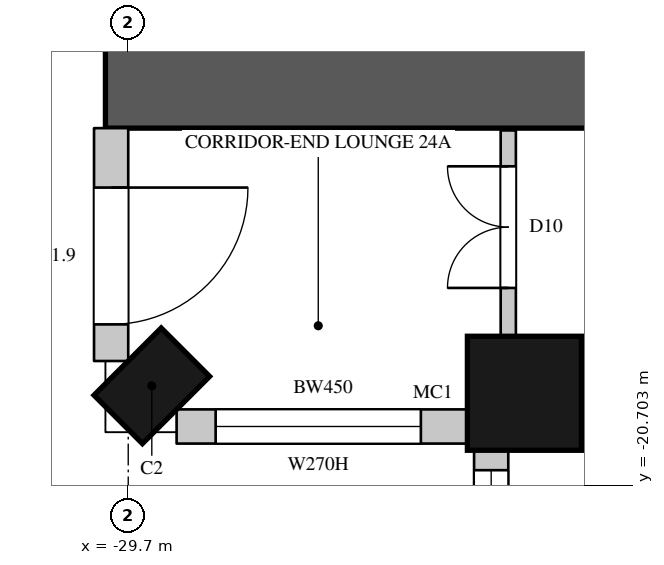
"""IFC4 building model, lengths in metres.
Left out: names, types, materials, properties, quantities, classifications, styles, units other than length and angle.
Written with IfcOpenShell. Run it as: python <this file> out.ifc"""

import sys

from ifc_helpers import new_model, si_unit, direction, frame, frame_2d, origin, origin_2d, place, context, subcontext, project, spatial, rectangle, circle, extrude, element, fill, save


model = new_model("IFC4")
c1 = context("Model", 3, precision=1e-05, world=origin(), true_north=direction((0.0, 1.0)))
c2 = subcontext(c1, "Body", "Model", "MODEL_VIEW")
j1 = project(units=[si_unit("LENGTHUNIT", "METRE"), si_unit("PLANEANGLEUNIT", "RADIAN")], contexts=[c1])
p1 = place(None, origin())
s1 = spatial("IfcSite", under=j1, at=p1, CompositionType="ELEMENT")
p2 = place(p1, origin())
s2 = spatial("IfcBuilding", under=s1, at=p2, CompositionType="ELEMENT")
p3 = place(p2, frame((0.0, 0.0, 116.7)))
s3 = spatial("IfcBuildingStorey", under=s2, at=p3, CompositionType="ELEMENT", Elevation=116.7)
p4 = place(p3, frame((-29.39, -19.39, 0.0), z_axis=(0.0, 0.0, 1.0), x_axis=(0.707106781187, -0.707106781187, 0.0)))
e1 = element("IfcColumn", 1, at=p4, inside=s3, PredefinedType="COLUMN", context=c2, shape_type="SweptSolid", body=[
    extrude(rectangle(XDim=0.9, YDim=1.25, at=origin_2d()), origin(), (0.0, 0.0, 1.0), 3.6),
])
p5 = place(p3, frame((-24.488, -19.488, 0.0), z_axis=(0.0, 0.0, 1.0), x_axis=(1.0, 0.0, 0.0)))
e2 = element("IfcColumn", 2, at=p5, inside=s3, PredefinedType="COLUMN", context=c2, shape_type="SweptSolid", body=[
    extrude(circle(Radius=0.75, at=origin_2d()), origin(), (0.0, 0.0, 1.0), 3.6),
])
p6 = place(p3, frame((-29.925, -16.0, 0.0), z_axis=(0.0, 0.0, 1.0), x_axis=(0.0, -1.0, 0.0)))
e3 = element("IfcWall", 3, at=p6, inside=s3, PredefinedType="SOLIDWALL", context=c2, shape_type="SweptSolid", body=[
    extrude(rectangle(XDim=3.064, YDim=0.45, at=frame_2d((1.532, 0.0))), origin(), (0.0, 0.0, 1.0), 3.3),
])
p7 = place(p6, frame((0.782, 0.0, 0.0)))
e4 = element("IfcOpeningElement", 4, at=p7, cuts=e3, PredefinedType="OPENING", context=c2, shape_type="SweptSolid", body=[
    extrude(rectangle(XDim=1.8, YDim=2.4, at=frame_2d((0.9, 1.2))), frame((0.0, 0.235, 0.0), z_axis=(0.0, -1.0, 0.0), x_axis=(1.0, 0.0, 0.0)), (0.0, 0.0, 1.0), 0.47),
])
p8 = place(p3, frame((-29.064, -19.925, 0.0), z_axis=(0.0, 0.0, 1.0), x_axis=(1.0, 0.0, 0.0)))
e5 = element("IfcWall", 5, at=p8, inside=s3, PredefinedType="SOLIDWALL", context=c2, shape_type="SweptSolid", body=[
    extrude(rectangle(XDim=3.857, YDim=0.45, at=frame_2d((1.928, 0.0))), origin(), (0.0, 0.0, 1.0), 3.3),
])
p9 = place(p8, frame((0.514, 0.0, 1.05)))
e6 = element("IfcOpeningElement", 6, at=p9, cuts=e5, PredefinedType="OPENING", context=c2, shape_type="SweptSolid", body=[
    extrude(rectangle(XDim=2.7, YDim=2.0, at=frame_2d((1.35, 1.0))), frame((0.0, 0.235, 0.0), z_axis=(0.0, -1.0, 0.0), x_axis=(1.0, 0.0, 0.0)), (0.0, 0.0, 1.0), 0.47),
])
p10 = place(p3, frame((-24.925, -20.207, 0.0), z_axis=(0.0, 0.0, 1.0), x_axis=(0.0, -1.0, 0.0)))
e7 = element("IfcWall", 7, at=p10, inside=s3, PredefinedType="SOLIDWALL", context=c2, shape_type="SweptSolid", body=[
    extrude(rectangle(XDim=1.843, YDim=0.45, at=frame_2d((0.921, 0.0))), origin(), (0.0, 0.0, 1.0), 3.3),
])
p11 = place(p10, frame((0.293, 0.0, 1.05)))
e8 = element("IfcOpeningElement", 8, at=p11, cuts=e7, PredefinedType="OPENING", context=c2, shape_type="SweptSolid", body=[
    extrude(rectangle(XDim=1.2, YDim=2.0, at=frame_2d((0.6, 1.0))), frame((0.0, 0.235, 0.0), z_axis=(0.0, -1.0, 0.0), x_axis=(1.0, 0.0, 0.0)), (0.0, 0.0, 1.0), 0.47),
])
p12 = place(p3, frame((-30.0, -15.4, 0.0), z_axis=(0.0, 0.0, 1.0), x_axis=(1.0, 0.0, 0.0)))
e9 = element("IfcWall", 9, at=p12, inside=s3, PredefinedType="SHEAR", context=c2, shape_type="SweptSolid", body=[
    extrude(rectangle(XDim=16.0, YDim=1.2, at=frame_2d((8.0, 0.0))), origin(), (0.0, 0.0, 1.0), 3.6),
])
p13 = place(p12, frame((13.4, 0.0, 0.0)))
e10 = element("IfcOpeningElement", 10, at=p13, cuts=e9, PredefinedType="OPENING", context=c2, shape_type="SweptSolid", body=[
    extrude(rectangle(XDim=1.5, YDim=2.4, at=frame_2d((0.75, 1.2))), frame((0.0, 0.61, 0.0), z_axis=(0.0, -1.0, 0.0), x_axis=(1.0, 0.0, 0.0)), (0.0, 0.0, 1.0), 1.22),
])
p14 = place(p3, frame((-24.7, -18.752, 0.0), z_axis=(0.0, 0.0, 1.0), x_axis=(0.0, 1.0, 0.0)))
e11 = element("IfcWall", 11, at=p14, inside=s3, PredefinedType="PARTITIONING", context=c2, shape_type="SweptSolid", body=[
    extrude(rectangle(XDim=2.722, YDim=0.2, at=frame_2d((1.361, 0.0))), origin(), (0.0, 0.0, 1.0), 3.3),
])
p15 = place(p14, frame((0.65, 0.0, 0.0)))
e12 = element("IfcOpeningElement", 12, at=p15, cuts=e11, PredefinedType="OPENING", context=c2, shape_type="SweptSolid", body=[
    extrude(rectangle(XDim=1.6, YDim=2.4, at=frame_2d((0.8, 1.2))), frame((0.0, 0.11, 0.0), z_axis=(0.0, -1.0, 0.0), x_axis=(1.0, 0.0, 0.0)), (0.0, 0.0, 1.0), 0.22),
])
p16 = place(p3, frame((-23.752, -19.7, 0.0), z_axis=(0.0, 0.0, 1.0), x_axis=(1.0, 0.0, 0.0)))
e13 = element("IfcWall", 13, at=p16, inside=s3, PredefinedType="PARTITIONING", context=c2, shape_type="SweptSolid", body=[
    extrude(rectangle(XDim=5.152, YDim=0.2, at=frame_2d((2.576, 0.0))), origin(), (0.0, 0.0, 1.0), 3.3),
])
p17 = place(p16, frame((0.8, 0.0, 0.0)))
e14 = element("IfcOpeningElement", 14, at=p17, cuts=e13, PredefinedType="OPENING", context=c2, shape_type="SweptSolid", body=[
    extrude(rectangle(XDim=0.95, YDim=2.2, at=frame_2d((0.475, 1.1))), frame((0.0, 0.11, 0.0), z_axis=(0.0, -1.0, 0.0), x_axis=(1.0, 0.0, 0.0)), (0.0, 0.0, 1.0), 0.22),
])
p18 = place(p7, origin())
e15 = element("IfcDoor", 15, at=p18, inside=s3, OperationType="SLIDING_TO_LEFT", PredefinedType="DOOR", context=c2, shape_type="SweptSolid", body=[
    extrude(rectangle(XDim=1.8, YDim=2.4, at=frame_2d((0.9, 1.2))), frame((0.0, 0.13, 0.0), z_axis=(0.0, -1.0, 0.0), x_axis=(1.0, 0.0, 0.0)), (0.0, 0.0, 1.0), 0.05),
])
fill(e4, e15)
p19 = place(p9, origin())
e16 = element("IfcWindow", 16, at=p19, inside=s3, PartitioningType="SINGLE_PANEL", PredefinedType="WINDOW", context=c2, shape_type="SweptSolid", body=[
    extrude(rectangle(XDim=2.7, YDim=2.0, at=frame_2d((1.35, 1.0))), frame((0.0, 0.135, 0.0), z_axis=(0.0, -1.0, 0.0), x_axis=(1.0, 0.0, 0.0)), (0.0, 0.0, 1.0), 0.06),
])
fill(e6, e16)
p20 = place(p11, origin())
e17 = element("IfcWindow", 17, at=p20, inside=s3, PartitioningType="SINGLE_PANEL", PredefinedType="WINDOW", context=c2, shape_type="SweptSolid", body=[
    extrude(rectangle(XDim=1.2, YDim=2.0, at=frame_2d((0.6, 1.0))), frame((0.0, 0.135, 0.0), z_axis=(0.0, -1.0, 0.0), x_axis=(1.0, 0.0, 0.0)), (0.0, 0.0, 1.0), 0.06),
])
fill(e8, e17)
p21 = place(p15, origin())
e18 = element("IfcDoor", 18, at=p21, inside=s3, OperationType="DOUBLE_DOOR_SINGLE_SWING", PredefinedType="DOOR", context=c2, shape_type="SweptSolid", body=[
    extrude(rectangle(XDim=1.6, YDim=2.4, at=frame_2d((0.8, 1.2))), frame((0.0, 0.025, 0.0), z_axis=(0.0, -1.0, 0.0), x_axis=(1.0, 0.0, 0.0)), (0.0, 0.0, 1.0), 0.05),
])
fill(e12, e18)
save(model, sys.argv[1])
